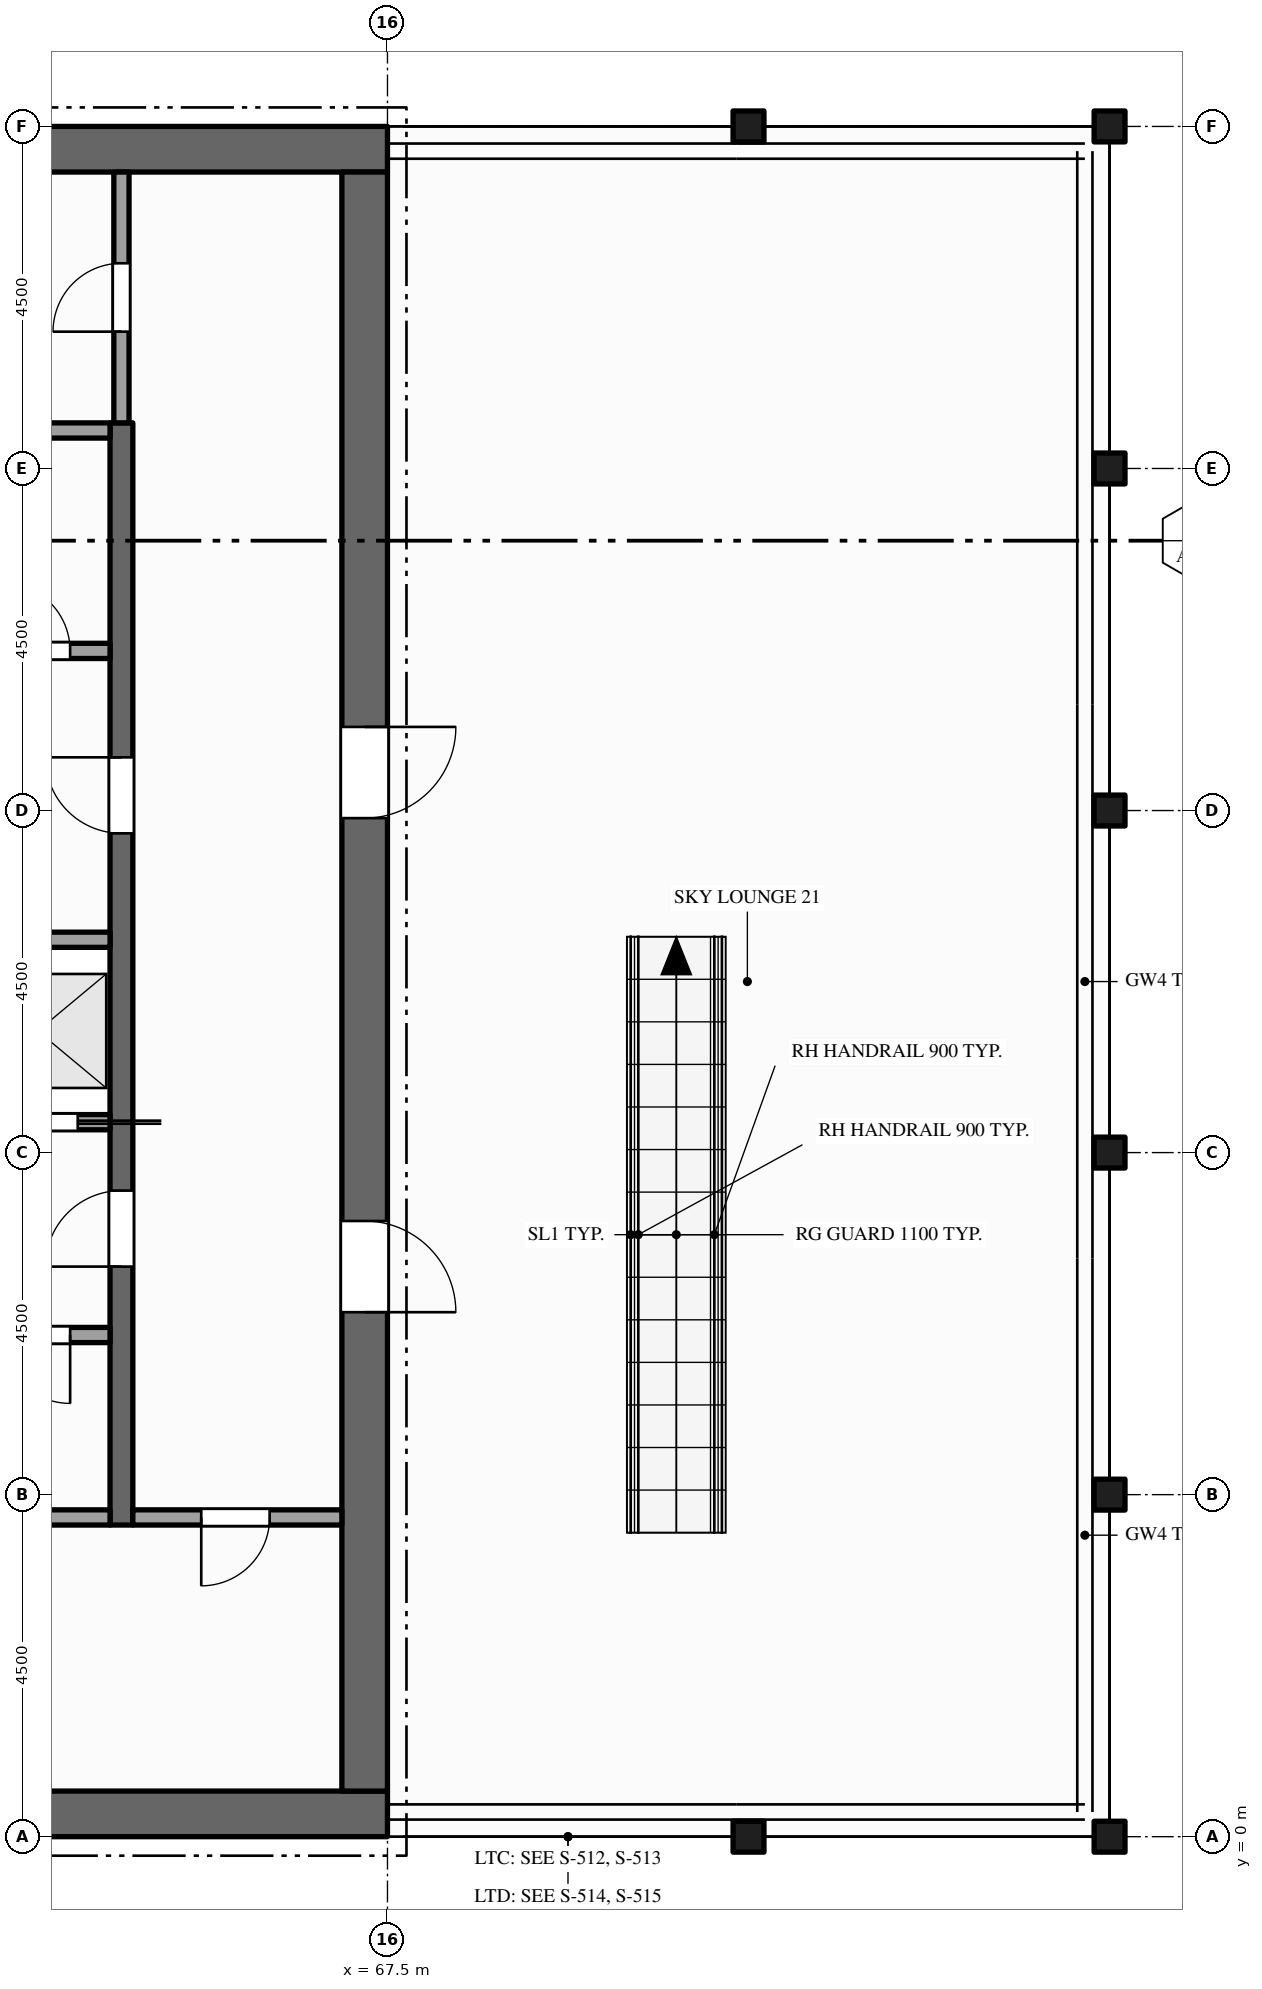
"""IFC4 building model, lengths in metres.
Left out: names, types, materials, properties, quantities, classifications, styles, units other than length and angle.
Written with IfcOpenShell. Run it as: python <this file> out.ifc"""

import sys

from ifc_helpers import new_model, si_unit, direction, frame, frame_2d, origin, place, context, subcontext, project, spatial, rectangle, extrude, element, fill, save


model = new_model("IFC4")
c1 = context("Model", 3, precision=1e-05, world=origin(), true_north=direction((0.0, 1.0)))
c2 = subcontext(c1, "Body", "Model", "MODEL_VIEW")
j1 = project(units=[si_unit("LENGTHUNIT", "METRE"), si_unit("PLANEANGLEUNIT", "RADIAN")], contexts=[c1])
p1 = place(None, origin())
s1 = spatial("IfcSite", under=j1, at=p1, CompositionType="ELEMENT")
p2 = place(p1, origin())
s2 = spatial("IfcBuilding", under=s1, at=p2, CompositionType="ELEMENT")
p3 = place(p2, frame((0.0, 0.0, 345.5)))
s3 = spatial("IfcBuildingStorey", under=s2, at=p3, CompositionType="ELEMENT", Elevation=345.5)
for number, where, z_axis, x_axis in (
    (1, (67.5, 0.3, -0.15), (0.0, 0.0, 1.0), (-1.0, 0.0, 0.0)),
    (2, (54.0, 22.2, -0.15), (0.0, 0.0, 1.0), (1.0, 0.0, 0.0)),
):
    element("IfcWall", number, at=place(p3, frame(where, z_axis=z_axis, x_axis=x_axis)), inside=s3, PredefinedType="SHEAR", context=c2, shape_type="SweptSolid", body=[
        extrude(rectangle(XDim=13.5, YDim=0.6, at=frame_2d((6.75, 0.0))), origin(), (0.0, 0.0, 1.0), 5.0),
    ])
p4 = place(p3, frame((67.2, 0.6, -0.15), z_axis=(0.0, 0.0, 1.0), x_axis=(0.0, 1.0, 0.0)))
e3 = element("IfcWall", 3, at=p4, inside=s3, PredefinedType="SHEAR", context=c2, shape_type="SweptSolid", body=[
    extrude(rectangle(XDim=21.3, YDim=0.6, at=frame_2d((10.65, 0.0))), origin(), (0.0, 0.0, 1.0), 5.0),
])
p5 = place(p4, frame((6.3, 0.0, 0.15)))
e4 = element("IfcOpeningElement", 4, at=p5, cuts=e3, PredefinedType="OPENING", context=c2, shape_type="SweptSolid", body=[
    extrude(rectangle(XDim=1.2, YDim=2.1, at=frame_2d((0.6, 1.05))), frame((0.0, 0.31, 0.0), z_axis=(0.0, -1.0, 0.0), x_axis=(1.0, 0.0, 0.0)), (0.0, 0.0, 1.0), 0.62),
])
p6 = place(p4, frame((12.8, 0.0, 0.15)))
e5 = element("IfcOpeningElement", 5, at=p6, cuts=e3, PredefinedType="OPENING", context=c2, shape_type="SweptSolid", body=[
    extrude(rectangle(XDim=1.2, YDim=2.1, at=frame_2d((0.6, 1.05))), frame((0.0, 0.31, 0.0), z_axis=(0.0, -1.0, 0.0), x_axis=(1.0, 0.0, 0.0)), (0.0, 0.0, 1.0), 0.62),
])
p7 = place(p3, frame((64.0, 4.1, 0.0), z_axis=(0.0, 0.0, 1.0), x_axis=(0.0, 1.0, 0.0)))
e6 = element("IfcWall", 6, at=p7, inside=s3, PredefinedType="SHEAR", context=c2, shape_type="SweptSolid", body=[
    extrude(rectangle(XDim=14.5, YDim=0.3, at=frame_2d((7.25, 0.0))), origin(), (0.0, 0.0, 1.0), 4.8),
])
p8 = place(p7, frame((3.4, 0.0, 0.0)))
e7 = element("IfcOpeningElement", 7, at=p8, cuts=e6, PredefinedType="OPENING", context=c2, shape_type="SweptSolid", body=[
    extrude(rectangle(XDim=1.0, YDim=2.1, at=frame_2d((0.5, 1.05))), frame((0.0, 0.16, 0.0), z_axis=(0.0, -1.0, 0.0), x_axis=(1.0, 0.0, 0.0)), (0.0, 0.0, 1.0), 0.32),
])
p9 = place(p7, frame((9.1, 0.0, 0.0)))
e8 = element("IfcOpeningElement", 8, at=p9, cuts=e6, PredefinedType="OPENING", context=c2, shape_type="SweptSolid", body=[
    extrude(rectangle(XDim=1.0, YDim=2.1, at=frame_2d((0.5, 1.05))), frame((0.0, 0.16, 0.0), z_axis=(0.0, -1.0, 0.0), x_axis=(1.0, 0.0, 0.0)), (0.0, 0.0, 1.0), 0.32),
])
p10 = place(p3, frame((64.0, 18.6, 0.0), z_axis=(0.0, 0.0, 1.0), x_axis=(0.0, 1.0, 0.0)))
e9 = element("IfcWall", 9, at=p10, inside=s3, PredefinedType="PARTITIONING", context=c2, shape_type="SweptSolid", body=[
    extrude(rectangle(XDim=3.3, YDim=0.2, at=frame_2d((1.65, 0.0))), origin(), (0.0, 0.0, 1.0), 4.8),
])
p11 = place(p10, frame((1.2, 0.0, 0.0)))
e10 = element("IfcOpeningElement", 10, at=p11, cuts=e9, PredefinedType="OPENING", context=c2, shape_type="SweptSolid", body=[
    extrude(rectangle(XDim=0.9, YDim=2.1, at=frame_2d((0.45, 1.05))), frame((0.0, 0.11, 0.0), z_axis=(0.0, -1.0, 0.0), x_axis=(1.0, 0.0, 0.0)), (0.0, 0.0, 1.0), 0.22),
])
p12 = place(p3, frame((61.9, 4.2, 0.0), z_axis=(0.0, 0.0, 1.0), x_axis=(1.0, 0.0, 0.0)))
e11 = element("IfcWall", 11, at=p12, inside=s3, PredefinedType="PARTITIONING", context=c2, shape_type="SweptSolid", body=[
    extrude(rectangle(XDim=1.95, YDim=0.2, at=frame_2d((0.975, 0.0))), origin(), (0.0, 0.0, 1.0), 4.35),
])
p13 = place(p3, frame((64.15, 4.2, 0.0), z_axis=(0.0, 0.0, 1.0), x_axis=(1.0, 0.0, 0.0)))
e12 = element("IfcWall", 12, at=p13, inside=s3, PredefinedType="PARTITIONING", context=c2, shape_type="SweptSolid", body=[
    extrude(rectangle(XDim=2.75, YDim=0.2, at=frame_2d((1.375, 0.0))), origin(), (0.0, 0.0, 1.0), 4.35),
])
p14 = place(p13, frame((0.9, 0.0, 0.0)))
e13 = element("IfcOpeningElement", 13, at=p14, cuts=e12, PredefinedType="OPENING", context=c2, shape_type="SweptSolid", body=[
    extrude(rectangle(XDim=0.9, YDim=2.1, at=frame_2d((0.45, 1.05))), frame((0.0, 0.11, 0.0), z_axis=(0.0, -1.0, 0.0), x_axis=(1.0, 0.0, 0.0)), (0.0, 0.0, 1.0), 0.22),
])
p15 = place(p3, frame((61.9, 6.6, 0.0), z_axis=(0.0, 0.0, 1.0), x_axis=(1.0, 0.0, 0.0)))
e14 = element("IfcWall", 14, at=p15, inside=s3, PredefinedType="PARTITIONING", context=c2, shape_type="SweptSolid", body=[
    extrude(rectangle(XDim=1.95, YDim=0.2, at=frame_2d((0.975, 0.0))), origin(), (0.0, 0.0, 1.0), 4.8),
])
p16 = place(p15, frame((0.525, 0.0, 0.0)))
e15 = element("IfcOpeningElement", 15, at=p16, cuts=e14, PredefinedType="OPENING", context=c2, shape_type="SweptSolid", body=[
    extrude(rectangle(XDim=0.9, YDim=2.1, at=frame_2d((0.45, 1.05))), frame((0.0, 0.11, 0.0), z_axis=(0.0, -1.0, 0.0), x_axis=(1.0, 0.0, 0.0)), (0.0, 0.0, 1.0), 0.22),
])
p17 = place(p3, frame((61.9, 9.4, 0.0), z_axis=(0.0, 0.0, 1.0), x_axis=(1.0, 0.0, 0.0)))
e16 = element("IfcWall", 16, at=p17, inside=s3, PredefinedType="SOLIDWALL", context=c2, shape_type="SweptSolid", body=[
    extrude(rectangle(XDim=1.95, YDim=0.2, at=frame_2d((0.975, 0.0))), origin(), (0.0, 0.0, 1.0), 4.8),
])
p18 = place(p17, frame((0.425, 0.0, 0.012)))
e17 = element("IfcOpeningElement", 17, at=p18, cuts=e16, PredefinedType="OPENING", context=c2, shape_type="SweptSolid", body=[
    extrude(rectangle(XDim=1.1, YDim=2.1, at=frame_2d((0.55, 1.05))), frame((0.0, 0.11, 0.0), z_axis=(0.0, -1.0, 0.0), x_axis=(1.0, 0.0, 0.0)), (0.0, 0.0, 1.0), 0.22),
])
p19 = place(p3, frame((61.9, 11.8, 0.0), z_axis=(0.0, 0.0, 1.0), x_axis=(1.0, 0.0, 0.0)))
e18 = element("IfcWall", 18, at=p19, inside=s3, PredefinedType="SOLIDWALL", context=c2, shape_type="SweptSolid", body=[
    extrude(rectangle(XDim=1.95, YDim=0.2, at=frame_2d((0.975, 0.0))), origin(), (0.0, 0.0, 1.0), 4.8),
])
p20 = place(p3, frame((61.9, 15.6, 0.0), z_axis=(0.0, 0.0, 1.0), x_axis=(1.0, 0.0, 0.0)))
e19 = element("IfcWall", 19, at=p20, inside=s3, PredefinedType="PARTITIONING", context=c2, shape_type="SweptSolid", body=[
    extrude(rectangle(XDim=1.95, YDim=0.2, at=frame_2d((0.975, 0.0))), origin(), (0.0, 0.0, 1.0), 4.8),
])
p21 = place(p20, frame((0.525, 0.0, 0.0)))
e20 = element("IfcOpeningElement", 20, at=p21, cuts=e19, PredefinedType="OPENING", context=c2, shape_type="SweptSolid", body=[
    extrude(rectangle(XDim=0.9, YDim=2.1, at=frame_2d((0.45, 1.05))), frame((0.0, 0.11, 0.0), z_axis=(0.0, -1.0, 0.0), x_axis=(1.0, 0.0, 0.0)), (0.0, 0.0, 1.0), 0.22),
])
p22 = place(p3, frame((61.9, 18.5, 0.0), z_axis=(0.0, 0.0, 1.0), x_axis=(1.0, 0.0, 0.0)))
e21 = element("IfcWall", 21, at=p22, inside=s3, PredefinedType="PARTITIONING", context=c2, shape_type="SweptSolid", body=[
    extrude(rectangle(XDim=1.95, YDim=0.2, at=frame_2d((0.975, 0.0))), origin(), (0.0, 0.0, 1.0), 4.8),
])
p23 = place(p18, origin())
e22 = element("IfcDoor", 22, at=p23, inside=s3, OperationType="SLIDING_TO_RIGHT", PredefinedType="DOOR", context=c2, shape_type="SweptSolid", body=[
    extrude(rectangle(XDim=1.1, YDim=2.1, at=frame_2d((0.55, 1.05))), frame((0.0, 0.025, 0.0), z_axis=(0.0, -1.0, 0.0), x_axis=(1.0, 0.0, 0.0)), (0.0, 0.0, 1.0), 0.05),
])
fill(e17, e22)
p24 = place(p8, origin())
e23 = element("IfcDoor", 23, at=p24, inside=s3, OperationType="SINGLE_SWING_LEFT", PredefinedType="DOOR", context=c2, shape_type="SweptSolid", body=[
    extrude(rectangle(XDim=1.0, YDim=2.1, at=frame_2d((0.5, 1.05))), frame((0.0, 0.025, 0.0), z_axis=(0.0, -1.0, 0.0), x_axis=(1.0, 0.0, 0.0)), (0.0, 0.0, 1.0), 0.05),
])
fill(e7, e23)
p25 = place(p9, origin())
e24 = element("IfcDoor", 24, at=p25, inside=s3, OperationType="SINGLE_SWING_RIGHT", PredefinedType="DOOR", context=c2, shape_type="SweptSolid", body=[
    extrude(rectangle(XDim=1.0, YDim=2.1, at=frame_2d((0.5, 1.05))), frame((0.0, 0.025, 0.0), z_axis=(0.0, -1.0, 0.0), x_axis=(1.0, 0.0, 0.0)), (0.0, 0.0, 1.0), 0.05),
])
fill(e8, e24)
p26 = place(p14, origin())
e25 = element("IfcDoor", 25, at=p26, inside=s3, OperationType="SINGLE_SWING_LEFT", PredefinedType="DOOR", context=c2, shape_type="SweptSolid", body=[
    extrude(rectangle(XDim=0.9, YDim=2.1, at=frame_2d((0.45, 1.05))), frame((0.0, 0.025, 0.0), z_axis=(0.0, -1.0, 0.0), x_axis=(1.0, 0.0, 0.0)), (0.0, 0.0, 1.0), 0.05),
])
fill(e13, e25)
p27 = place(p11, origin())
e26 = element("IfcDoor", 26, at=p27, inside=s3, OperationType="SINGLE_SWING_LEFT", PredefinedType="DOOR", context=c2, shape_type="SweptSolid", body=[
    extrude(rectangle(XDim=0.9, YDim=2.1, at=frame_2d((0.45, 1.05))), frame((0.0, 0.025, 0.0), z_axis=(0.0, -1.0, 0.0), x_axis=(1.0, 0.0, 0.0)), (0.0, 0.0, 1.0), 0.05),
])
fill(e10, e26)
p28 = place(p16, origin())
e27 = element("IfcDoor", 27, at=p28, inside=s3, OperationType="SINGLE_SWING_RIGHT", PredefinedType="DOOR", context=c2, shape_type="SweptSolid", body=[
    extrude(rectangle(XDim=0.9, YDim=2.1, at=frame_2d((0.45, 1.05))), frame((0.0, 0.025, 0.0), z_axis=(0.0, -1.0, 0.0), x_axis=(1.0, 0.0, 0.0)), (0.0, 0.0, 1.0), 0.05),
])
fill(e15, e27)
p29 = place(p21, origin())
e28 = element("IfcDoor", 28, at=p29, inside=s3, OperationType="SINGLE_SWING_LEFT", PredefinedType="DOOR", context=c2, shape_type="SweptSolid", body=[
    extrude(rectangle(XDim=0.9, YDim=2.1, at=frame_2d((0.45, 1.05))), frame((0.0, 0.025, 0.0), z_axis=(0.0, -1.0, 0.0), x_axis=(1.0, 0.0, 0.0)), (0.0, 0.0, 1.0), 0.05),
])
fill(e20, e28)
p30 = place(p5, origin())
e29 = element("IfcDoor", 29, at=p30, inside=s3, OperationType="SINGLE_SWING_LEFT", PredefinedType="DOOR", context=c2, shape_type="SweptSolid", body=[
    extrude(rectangle(XDim=1.2, YDim=2.1, at=frame_2d((0.6, 1.05))), frame((0.0, 0.025, 0.0), z_axis=(0.0, -1.0, 0.0), x_axis=(1.0, 0.0, 0.0)), (0.0, 0.0, 1.0), 0.05),
])
fill(e4, e29)
p31 = place(p6, origin())
e30 = element("IfcDoor", 30, at=p31, inside=s3, OperationType="SINGLE_SWING_RIGHT", PredefinedType="DOOR", context=c2, shape_type="SweptSolid", body=[
    extrude(rectangle(XDim=1.2, YDim=2.1, at=frame_2d((0.6, 1.05))), frame((0.0, 0.025, 0.0), z_axis=(0.0, -1.0, 0.0), x_axis=(1.0, 0.0, 0.0)), (0.0, 0.0, 1.0), 0.05),
])
fill(e5, e30)
save(model, sys.argv[1])
